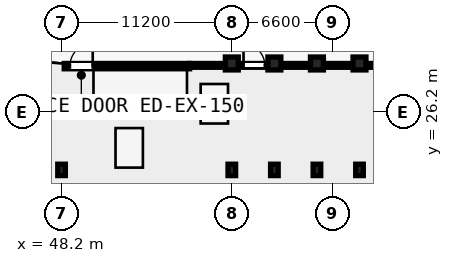
"""IFC4 building model, lengths in metres.
Left out: names, types, materials, properties, quantities, classifications, styles, units other than length and angle.
Written with IfcOpenShell. Run it as: python <this file> out.ifc"""

import sys

from ifc_helpers import new_model, si_unit, direction, frame, frame_2d, origin, origin_2d, place, context, subcontext, project, spatial, rectangle, extrude, element, fill, save


model = new_model("IFC4")
c1 = context("Model", 3, precision=1e-05, world=origin(), true_north=direction((0.0, 1.0)))
c2 = subcontext(c1, "Body", "Model", "MODEL_VIEW")
j1 = project(units=[si_unit("LENGTHUNIT", "METRE"), si_unit("PLANEANGLEUNIT", "RADIAN")], contexts=[c1])
p1 = place(None, origin())
s1 = spatial("IfcSite", under=j1, at=p1, CompositionType="ELEMENT")
p2 = place(p1, origin())
s2 = spatial("IfcBuilding", under=s1, at=p2, CompositionType="ELEMENT")
p3 = place(p2, origin())
s3 = spatial("IfcBuildingStorey", under=s2, at=p3, CompositionType="ELEMENT", Elevation=0.0)
p4 = place(p3, frame((48.375, 29.225, 0.0), z_axis=(0.0, 0.0, 1.0), x_axis=(1.0, 0.0, 0.0)))
e1 = element("IfcWall", 1, at=p4, inside=s3, PredefinedType="SHEAR", context=c2, shape_type="SweptSolid", body=[
    extrude(rectangle(XDim=8.25, YDim=0.35, at=frame_2d((4.125, 0.0))), origin(), (0.0, 0.0, 1.0), 4.15),
])
p5 = place(p4, frame((0.375, 0.0, 0.0)))
e2 = element("IfcOpeningElement", 2, at=p5, cuts=e1, PredefinedType="OPENING", context=c2, shape_type="SweptSolid", body=[
    extrude(rectangle(XDim=1.5, YDim=2.15, at=frame_2d((0.75, 1.075))), frame((0.0, 0.185, 0.0), z_axis=(0.0, -1.0, 0.0), x_axis=(1.0, 0.0, 0.0)), (0.0, 0.0, 1.0), 0.37),
])
p6 = place(p3, frame((48.55, 25.775, 0.0), z_axis=(0.0, 0.0, 1.0), x_axis=(1.0, 0.0, 0.0)))
e3 = element("IfcWall", 3, at=p6, inside=s3, PredefinedType="SHEAR", context=c2, shape_type="SweptSolid", body=[
    extrude(rectangle(XDim=7.9, YDim=0.35, at=frame_2d((3.95, 0.0))), origin(), (0.0, 0.0, 1.0), 4.15),
])
p7 = place(p6, frame((0.28, 0.0, 0.0)))
e4 = element("IfcOpeningElement", 4, at=p7, cuts=e3, PredefinedType="OPENING", context=c2, shape_type="SweptSolid", body=[
    extrude(rectangle(XDim=1.24, YDim=2.15, at=frame_2d((0.62, 1.075))), frame((0.0, 0.185, 0.0), z_axis=(0.0, -1.0, 0.0), x_axis=(1.0, 0.0, 0.0)), (0.0, 0.0, 1.0), 0.37),
])
for number, where, z_axis, x_axis in (
    (5, (48.375, 29.05, 0.0), (0.0, 0.0, 1.0), (0.0, -1.0, 0.0)),
    (6, (56.625, 29.05, 0.0), (0.0, 0.0, 1.0), (0.0, -1.0, 0.0)),
):
    element("IfcWall", number, at=place(p3, frame(where, z_axis=z_axis, x_axis=x_axis)), inside=s3, PredefinedType="SHEAR", context=c2, shape_type="SweptSolid", body=[
        extrude(rectangle(XDim=3.6, YDim=0.35, at=frame_2d((1.8, 0.0))), origin(), (0.0, 0.0, 1.0), 4.15),
    ])
p8 = place(p3, frame((48.2, 22.4, 0.0), z_axis=(0.0, 0.0, 1.0), x_axis=(1.0, 0.0, 0.0)))
e7 = element("IfcColumn", 7, at=p8, inside=s3, PredefinedType="COLUMN", context=c2, shape_type="SweptSolid", body=[
    extrude(rectangle(XDim=0.5, YDim=0.75, at=origin_2d()), origin(), (0.0, 0.0, 1.0), 4.15),
])
p9 = place(p3, frame((59.4, 29.4, 0.0), z_axis=(0.0, 0.0, 1.0), x_axis=(1.0, 0.0, 0.0)))
e8 = element("IfcColumn", 8, at=p9, inside=s3, PredefinedType="COLUMN", context=c2, shape_type="SweptSolid", body=[
    extrude(rectangle(XDim=0.85, YDim=0.85, at=origin_2d()), origin(), (0.0, 0.0, 1.0), 4.15),
])
p10 = place(p3, frame((59.4, 22.4, 0.0), z_axis=(0.0, 0.0, 1.0), x_axis=(1.0, 0.0, 0.0)))
e9 = element("IfcColumn", 9, at=p10, inside=s3, PredefinedType="COLUMN", context=c2, shape_type="SweptSolid", body=[
    extrude(rectangle(XDim=0.5, YDim=0.75, at=origin_2d()), origin(), (0.0, 0.0, 1.0), 4.15),
])
p11 = place(p3, frame((62.2, 29.4, 0.0), z_axis=(0.0, 0.0, 1.0), x_axis=(1.0, 0.0, 0.0)))
e10 = element("IfcColumn", 10, at=p11, inside=s3, PredefinedType="COLUMN", context=c2, shape_type="SweptSolid", body=[
    extrude(rectangle(XDim=0.85, YDim=0.85, at=origin_2d()), origin(), (0.0, 0.0, 1.0), 4.15),
])
p12 = place(p3, frame((62.2, 22.4, 0.0), z_axis=(0.0, 0.0, 1.0), x_axis=(1.0, 0.0, 0.0)))
e11 = element("IfcColumn", 11, at=p12, inside=s3, PredefinedType="COLUMN", context=c2, shape_type="SweptSolid", body=[
    extrude(rectangle(XDim=0.5, YDim=0.75, at=origin_2d()), origin(), (0.0, 0.0, 1.0), 4.15),
])
p13 = place(p3, frame((65.0, 29.4, 0.0), z_axis=(0.0, 0.0, 1.0), x_axis=(1.0, 0.0, 0.0)))
e12 = element("IfcColumn", 12, at=p13, inside=s3, PredefinedType="COLUMN", context=c2, shape_type="SweptSolid", body=[
    extrude(rectangle(XDim=0.85, YDim=0.85, at=origin_2d()), origin(), (0.0, 0.0, 1.0), 4.15),
])
p14 = place(p3, frame((65.0, 22.4, 0.0), z_axis=(0.0, 0.0, 1.0), x_axis=(1.0, 0.0, 0.0)))
e13 = element("IfcColumn", 13, at=p14, inside=s3, PredefinedType="COLUMN", context=c2, shape_type="SweptSolid", body=[
    extrude(rectangle(XDim=0.5, YDim=0.75, at=origin_2d()), origin(), (0.0, 0.0, 1.0), 4.15),
])
p15 = place(p3, frame((67.8, 29.4, 0.0), z_axis=(0.0, 0.0, 1.0), x_axis=(1.0, 0.0, 0.0)))
e14 = element("IfcColumn", 14, at=p15, inside=s3, PredefinedType="COLUMN", context=c2, shape_type="SweptSolid", body=[
    extrude(rectangle(XDim=0.85, YDim=0.85, at=origin_2d()), origin(), (0.0, 0.0, 1.0), 4.15),
])
p16 = place(p3, frame((67.8, 22.4, 0.0), z_axis=(0.0, 0.0, 1.0), x_axis=(1.0, 0.0, 0.0)))
e15 = element("IfcColumn", 15, at=p16, inside=s3, PredefinedType="COLUMN", context=c2, shape_type="SweptSolid", body=[
    extrude(rectangle(XDim=0.5, YDim=0.75, at=origin_2d()), origin(), (0.0, 0.0, 1.0), 4.15),
])
p17 = place(p3, frame((57.25, 28.05, 0.0), z_axis=(0.0, 0.0, 1.0), x_axis=(0.0, -1.0, 0.0)))
e16 = element("IfcWall", 16, at=p17, inside=s3, PredefinedType="STANDARD", context=c2, shape_type="SweptSolid", body=[
    extrude(rectangle(XDim=2.6, YDim=0.2, at=frame_2d((1.3, 0.0))), origin(), (0.0, 0.0, 1.0), 4.15),
])
p18 = place(p3, frame((59.25, 28.05, 0.0), z_axis=(0.0, 0.0, 1.0), x_axis=(0.0, -1.0, 0.0)))
e17 = element("IfcWall", 17, at=p18, inside=s3, PredefinedType="STANDARD", context=c2, shape_type="SweptSolid", body=[
    extrude(rectangle(XDim=2.6, YDim=0.2, at=frame_2d((1.3, 0.0))), origin(), (0.0, 0.0, 1.0), 3.492),
])
p19 = place(p3, frame((57.35, 28.15, 0.0), z_axis=(0.0, 0.0, 1.0), x_axis=(1.0, 0.0, 0.0)))
e18 = element("IfcWall", 18, at=p19, inside=s3, PredefinedType="STANDARD", context=c2, shape_type="SweptSolid", body=[
    extrude(rectangle(XDim=1.8, YDim=0.2, at=frame_2d((0.9, 0.0))), origin(), (0.0, 0.0, 1.0), 4.15),
])
p20 = place(p3, frame((57.35, 25.35, 0.0), z_axis=(0.0, 0.0, 1.0), x_axis=(1.0, 0.0, 0.0)))
e19 = element("IfcWall", 19, at=p20, inside=s3, PredefinedType="STANDARD", context=c2, shape_type="SweptSolid", body=[
    extrude(rectangle(XDim=1.8, YDim=0.2, at=frame_2d((0.9, 0.0))), origin(), (0.0, 0.0, 1.0), 4.15),
])
p21 = place(p20, frame((0.39, 0.0, 0.0)))
e20 = element("IfcOpeningElement", 20, at=p21, cuts=e19, PredefinedType="OPENING", context=c2, shape_type="SweptSolid", body=[
    extrude(rectangle(XDim=1.02, YDim=2.15, at=frame_2d((0.51, 1.075))), frame((0.0, 0.11, 0.0), z_axis=(0.0, -1.0, 0.0), x_axis=(1.0, 0.0, 0.0)), (0.0, 0.0, 1.0), 0.22),
])
p22 = place(p3, frame((51.65, 25.25, 0.0), z_axis=(0.0, 0.0, 1.0), x_axis=(1.0, 0.0, 0.0)))
e21 = element("IfcWall", 21, at=p22, inside=s3, PredefinedType="STANDARD", context=c2, shape_type="SweptSolid", body=[
    extrude(rectangle(XDim=2.0, YDim=0.2, at=frame_2d((1.0, 0.0))), origin(), (0.0, 0.0, 1.0), 4.15),
])
p23 = place(p3, frame((51.65, 22.45, 0.0), z_axis=(0.0, 0.0, 1.0), x_axis=(1.0, 0.0, 0.0)))
e22 = element("IfcWall", 22, at=p23, inside=s3, PredefinedType="STANDARD", context=c2, shape_type="SweptSolid", body=[
    extrude(rectangle(XDim=2.0, YDim=0.2, at=frame_2d((1.0, 0.0))), origin(), (0.0, 0.0, 1.0), 3.492),
])
p24 = place(p3, frame((51.65, 25.15, 0.0), z_axis=(0.0, 0.0, 1.0), x_axis=(0.0, -1.0, 0.0)))
e23 = element("IfcWall", 23, at=p24, inside=s3, PredefinedType="STANDARD", context=c2, shape_type="SweptSolid", body=[
    extrude(rectangle(XDim=2.6, YDim=0.2, at=frame_2d((1.3, 0.0))), origin(), (0.0, 0.0, 1.0), 3.492),
])
p25 = place(p3, frame((53.65, 25.15, 0.0), z_axis=(0.0, 0.0, 1.0), x_axis=(0.0, -1.0, 0.0)))
e24 = element("IfcWall", 24, at=p25, inside=s3, PredefinedType="STANDARD", context=c2, shape_type="SweptSolid", body=[
    extrude(rectangle(XDim=2.6, YDim=0.2, at=frame_2d((1.3, 0.0))), origin(), (0.0, 0.0, 1.0), 3.492),
])
p26 = place(p25, frame((0.79, 0.0, 0.0)))
e25 = element("IfcOpeningElement", 25, at=p26, cuts=e24, PredefinedType="OPENING", context=c2, shape_type="SweptSolid", body=[
    extrude(rectangle(XDim=1.02, YDim=2.15, at=frame_2d((0.51, 1.075))), frame((0.0, 0.11, 0.0), z_axis=(0.0, -1.0, 0.0), x_axis=(1.0, 0.0, 0.0)), (0.0, 0.0, 1.0), 0.22),
])
p27 = place(p3, frame((53.75, 22.4, 0.0), z_axis=(0.0, 0.0, 1.0), x_axis=(1.0, 0.0, 0.0)))
e26 = element("IfcWall", 26, at=p27, inside=s3, PredefinedType="STANDARD", context=c2, shape_type="SweptSolid", body=[
    extrude(rectangle(XDim=5.6, YDim=0.2, at=frame_2d((2.8, 0.0))), origin(), (0.0, 0.0, 1.0), 3.492),
])
p28 = place(p27, frame((1.91, 0.0, 0.0)))
e27 = element("IfcOpeningElement", 27, at=p28, cuts=e26, PredefinedType="OPENING", context=c2, shape_type="SweptSolid", body=[
    extrude(rectangle(XDim=1.22, YDim=2.15, at=frame_2d((0.61, 1.075))), frame((0.0, 0.11, 0.0), z_axis=(0.0, -1.0, 0.0), x_axis=(1.0, 0.0, 0.0)), (0.0, 0.0, 1.0), 0.22),
])
p29 = place(p3, frame((59.4, 22.4, 0.0), z_axis=(0.0, 0.0, 1.0), x_axis=(1.0, 0.0, 0.0)))
e28 = element("IfcWall", 28, at=p29, inside=s3, PredefinedType="STANDARD", context=c2, shape_type="SweptSolid", body=[
    extrude(rectangle(XDim=2.8, YDim=0.2, at=frame_2d((1.4, 0.0))), origin(), (0.0, 0.0, 1.0), 3.492),
])
p30 = place(p29, frame((0.9, 0.0, 0.0)))
e29 = element("IfcOpeningElement", 29, at=p30, cuts=e28, PredefinedType="OPENING", context=c2, shape_type="SweptSolid", body=[
    extrude(rectangle(XDim=1.0, YDim=2.15, at=frame_2d((0.5, 1.075))), frame((0.0, 0.11, 0.0), z_axis=(0.0, -1.0, 0.0), x_axis=(1.0, 0.0, 0.0)), (0.0, 0.0, 1.0), 0.22),
])
p31 = place(p3, frame((62.2, 22.4, 0.0), z_axis=(0.0, 0.0, 1.0), x_axis=(1.0, 0.0, 0.0)))
e30 = element("IfcWall", 30, at=p31, inside=s3, PredefinedType="STANDARD", context=c2, shape_type="SweptSolid", body=[
    extrude(rectangle(XDim=2.8, YDim=0.2, at=frame_2d((1.4, 0.0))), origin(), (0.0, 0.0, 1.0), 3.492),
])
p32 = place(p3, frame((65.0, 22.4, 0.0), z_axis=(0.0, 0.0, 1.0), x_axis=(1.0, 0.0, 0.0)))
e31 = element("IfcWall", 31, at=p32, inside=s3, PredefinedType="STANDARD", context=c2, shape_type="SweptSolid", body=[
    extrude(rectangle(XDim=2.8, YDim=0.2, at=frame_2d((1.4, 0.0))), origin(), (0.0, 0.0, 1.0), 3.492),
])
p33 = place(p32, frame((0.9, 0.0, 0.0)))
e32 = element("IfcOpeningElement", 32, at=p33, cuts=e31, PredefinedType="OPENING", context=c2, shape_type="SweptSolid", body=[
    extrude(rectangle(XDim=1.0, YDim=2.15, at=frame_2d((0.5, 1.075))), frame((0.0, 0.11, 0.0), z_axis=(0.0, -1.0, 0.0), x_axis=(1.0, 0.0, 0.0)), (0.0, 0.0, 1.0), 0.22),
])
p34 = place(p3, frame((67.8, 22.4, 0.0), z_axis=(0.0, 0.0, 1.0), x_axis=(1.0, 0.0, 0.0)))
e33 = element("IfcWall", 33, at=p34, inside=s3, PredefinedType="STANDARD", context=c2, shape_type="SweptSolid", body=[
    extrude(rectangle(XDim=2.8, YDim=0.2, at=frame_2d((1.4, 0.0))), origin(), (0.0, 0.0, 1.0), 3.492),
])
p35 = place(p3, frame((62.2, 29.2, 0.0), z_axis=(0.0, 0.0, 1.0), x_axis=(0.0, -1.0, 0.0)))
e34 = element("IfcWall", 34, at=p35, inside=s3, PredefinedType="PARTITIONING", context=c2, shape_type="SweptSolid", body=[
    extrude(rectangle(XDim=6.75, YDim=0.15, at=frame_2d((3.375, 0.0))), origin(), (0.0, 0.0, 1.0), 3.492),
])
p36 = place(p35, frame((2.925, 0.0, 0.0)))
e35 = element("IfcOpeningElement", 35, at=p36, cuts=e34, PredefinedType="OPENING", context=c2, shape_type="SweptSolid", body=[
    extrude(rectangle(XDim=0.9, YDim=2.1, at=frame_2d((0.45, 1.05))), frame((0.0, 0.085, 0.0), z_axis=(0.0, -1.0, 0.0), x_axis=(1.0, 0.0, 0.0)), (0.0, 0.0, 1.0), 0.17),
])
p37 = place(p3, frame((65.0, 29.2, 0.0), z_axis=(0.0, 0.0, 1.0), x_axis=(0.0, -1.0, 0.0)))
e36 = element("IfcWall", 36, at=p37, inside=s3, PredefinedType="STANDARD", context=c2, shape_type="SweptSolid", body=[
    extrude(rectangle(XDim=6.75, YDim=0.22, at=frame_2d((3.375, 0.0))), origin(), (0.0, 0.0, 1.0), 3.492),
])
p38 = place(p3, frame((67.8, 29.2, 0.0), z_axis=(0.0, 0.0, 1.0), x_axis=(0.0, -1.0, 0.0)))
e37 = element("IfcWall", 37, at=p38, inside=s3, PredefinedType="PARTITIONING", context=c2, shape_type="SweptSolid", body=[
    extrude(rectangle(XDim=6.75, YDim=0.15, at=frame_2d((3.375, 0.0))), origin(), (0.0, 0.0, 1.0), 3.492),
])
p39 = place(p38, frame((2.925, 0.0, 0.0)))
e38 = element("IfcOpeningElement", 38, at=p39, cuts=e37, PredefinedType="OPENING", context=c2, shape_type="SweptSolid", body=[
    extrude(rectangle(XDim=0.9, YDim=2.1, at=frame_2d((0.45, 1.05))), frame((0.0, 0.085, 0.0), z_axis=(0.0, -1.0, 0.0), x_axis=(1.0, 0.0, 0.0)), (0.0, 0.0, 1.0), 0.17),
])
p40 = place(p3, frame((48.2, 22.4, 0.0), z_axis=(0.0, 0.0, 1.0), x_axis=(-0.996191949488, 0.087187153726, 0.0)))
e39 = element("IfcWall", 39, at=p40, inside=s3, PredefinedType="STANDARD", context=c2, shape_type="SweptSolid", body=[
    extrude(rectangle(XDim=4.497, YDim=0.2, at=frame_2d((2.249, 0.0))), origin(), (0.0, 0.0, 1.0), 3.492),
])
p41 = place(p40, frame((1.729, 0.0, 0.0)))
e40 = element("IfcOpeningElement", 40, at=p41, cuts=e39, PredefinedType="OPENING", context=c2, shape_type="SweptSolid", body=[
    extrude(rectangle(XDim=1.04, YDim=2.15, at=frame_2d((0.52, 1.075))), frame((0.0, 0.11, 0.0), z_axis=(0.0, -1.0, 0.0), x_axis=(1.0, 0.0, 0.0)), (0.0, 0.0, 1.0), 0.22),
])
p42 = place(p3, frame((48.2, 25.65, 0.0), z_axis=(0.0, 0.0, 1.0), x_axis=(0.0, -1.0, 0.0)))
e41 = element("IfcWall", 41, at=p42, inside=s3, PredefinedType="STANDARD", context=c2, shape_type="SweptSolid", body=[
    extrude(rectangle(XDim=3.2, YDim=0.22, at=frame_2d((1.6, 0.0))), origin(), (0.0, 0.0, 1.0), 3.492),
])
p43 = place(p3, frame((56.628, 29.275, 0.0), z_axis=(0.0, 0.0, 1.0), x_axis=(1.0, 0.0, 0.0)))
e42 = element("IfcWall", 42, at=p43, inside=s3, PredefinedType="STANDARD", context=c2, shape_type="SweptSolid", body=[
    extrude(rectangle(XDim=2.422, YDim=0.25, at=frame_2d((1.211, 0.0))), origin(), (0.0, 0.0, 1.0), 3.692),
])
p44 = place(p43, frame((0.822, 0.0, 0.88)))
e43 = element("IfcOpeningElement", 43, at=p44, cuts=e42, PredefinedType="OPENING", context=c2, shape_type="SweptSolid", body=[
    extrude(rectangle(XDim=1.2, YDim=1.5, at=frame_2d((0.6, 0.75))), frame((0.0, 0.135, 0.0), z_axis=(0.0, -1.0, 0.0), x_axis=(1.0, 0.0, 0.0)), (0.0, 0.0, 1.0), 0.27),
])
p45 = place(p3, frame((59.82, 29.275, 0.0), z_axis=(0.0, 0.0, 1.0), x_axis=(1.0, 0.0, 0.0)))
e44 = element("IfcWall", 44, at=p45, inside=s3, PredefinedType="STANDARD", context=c2, shape_type="SweptSolid", body=[
    extrude(rectangle(XDim=1.96, YDim=0.25, at=frame_2d((0.98, 0.0))), origin(), (0.0, 0.0, 1.0), 3.692),
])
p46 = place(p45, frame((0.35, 0.0, 0.0)))
e45 = element("IfcOpeningElement", 45, at=p46, cuts=e44, PredefinedType="OPENING", context=c2, shape_type="SweptSolid", body=[
    extrude(rectangle(XDim=1.4, YDim=2.15, at=frame_2d((0.7, 1.075))), frame((0.0, 0.135, 0.0), z_axis=(0.0, -1.0, 0.0), x_axis=(1.0, 0.0, 0.0)), (0.0, 0.0, 1.0), 0.27),
])
p47 = place(p3, frame((62.62, 29.275, 0.0), z_axis=(0.0, 0.0, 1.0), x_axis=(1.0, 0.0, 0.0)))
e46 = element("IfcWall", 46, at=p47, inside=s3, PredefinedType="STANDARD", context=c2, shape_type="SweptSolid", body=[
    extrude(rectangle(XDim=1.96, YDim=0.25, at=frame_2d((0.98, 0.0))), origin(), (0.0, 0.0, 1.0), 3.692),
])
p48 = place(p47, frame((0.38, 0.0, 0.88)))
e47 = element("IfcOpeningElement", 47, at=p48, cuts=e46, PredefinedType="OPENING", context=c2, shape_type="SweptSolid", body=[
    extrude(rectangle(XDim=1.2, YDim=1.5, at=frame_2d((0.6, 0.75))), frame((0.0, 0.135, 0.0), z_axis=(0.0, -1.0, 0.0), x_axis=(1.0, 0.0, 0.0)), (0.0, 0.0, 1.0), 0.27),
])
p49 = place(p3, frame((65.42, 29.275, 0.0), z_axis=(0.0, 0.0, 1.0), x_axis=(1.0, 0.0, 0.0)))
e48 = element("IfcWall", 48, at=p49, inside=s3, PredefinedType="STANDARD", context=c2, shape_type="SweptSolid", body=[
    extrude(rectangle(XDim=1.96, YDim=0.25, at=frame_2d((0.98, 0.0))), origin(), (0.0, 0.0, 1.0), 3.692),
])
p50 = place(p49, frame((0.38, 0.0, 0.88)))
e49 = element("IfcOpeningElement", 49, at=p50, cuts=e48, PredefinedType="OPENING", context=c2, shape_type="SweptSolid", body=[
    extrude(rectangle(XDim=1.2, YDim=1.5, at=frame_2d((0.6, 0.75))), frame((0.0, 0.135, 0.0), z_axis=(0.0, -1.0, 0.0), x_axis=(1.0, 0.0, 0.0)), (0.0, 0.0, 1.0), 0.27),
])
p51 = place(p3, frame((68.22, 29.275, 0.0), z_axis=(0.0, 0.0, 1.0), x_axis=(1.0, 0.0, 0.0)))
e50 = element("IfcWall", 50, at=p51, inside=s3, PredefinedType="STANDARD", context=c2, shape_type="SweptSolid", body=[
    extrude(rectangle(XDim=1.96, YDim=0.25, at=frame_2d((0.98, 0.0))), origin(), (0.0, 0.0, 1.0), 3.692),
])
p52 = place(p51, frame((0.38, 0.0, 0.88)))
e51 = element("IfcOpeningElement", 51, at=p52, cuts=e50, PredefinedType="OPENING", context=c2, shape_type="SweptSolid", body=[
    extrude(rectangle(XDim=1.2, YDim=1.5, at=frame_2d((0.6, 0.75))), frame((0.0, 0.135, 0.0), z_axis=(0.0, -1.0, 0.0), x_axis=(1.0, 0.0, 0.0)), (0.0, 0.0, 1.0), 0.27),
])
p53 = place(p44, origin())
e52 = element("IfcWindow", 52, at=p53, inside=s3, PartitioningType="SINGLE_PANEL", PredefinedType="WINDOW", context=c2, shape_type="SweptSolid", body=[
    extrude(rectangle(XDim=1.2, YDim=1.5, at=frame_2d((0.6, 0.75))), frame((0.0, 0.03, 0.0), z_axis=(0.0, -1.0, 0.0), x_axis=(1.0, 0.0, 0.0)), (0.0, 0.0, 1.0), 0.06),
])
fill(e43, e52)
p54 = place(p48, origin())
e53 = element("IfcWindow", 53, at=p54, inside=s3, PartitioningType="SINGLE_PANEL", PredefinedType="WINDOW", context=c2, shape_type="SweptSolid", body=[
    extrude(rectangle(XDim=1.2, YDim=1.5, at=frame_2d((0.6, 0.75))), frame((0.0, 0.03, 0.0), z_axis=(0.0, -1.0, 0.0), x_axis=(1.0, 0.0, 0.0)), (0.0, 0.0, 1.0), 0.06),
])
fill(e47, e53)
p55 = place(p50, origin())
e54 = element("IfcWindow", 54, at=p55, inside=s3, PartitioningType="SINGLE_PANEL", PredefinedType="WINDOW", context=c2, shape_type="SweptSolid", body=[
    extrude(rectangle(XDim=1.2, YDim=1.5, at=frame_2d((0.6, 0.75))), frame((0.0, 0.03, 0.0), z_axis=(0.0, -1.0, 0.0), x_axis=(1.0, 0.0, 0.0)), (0.0, 0.0, 1.0), 0.06),
])
fill(e49, e54)
p56 = place(p52, origin())
e55 = element("IfcWindow", 55, at=p56, inside=s3, PartitioningType="SINGLE_PANEL", PredefinedType="WINDOW", context=c2, shape_type="SweptSolid", body=[
    extrude(rectangle(XDim=1.2, YDim=1.5, at=frame_2d((0.6, 0.75))), frame((0.0, 0.03, 0.0), z_axis=(0.0, -1.0, 0.0), x_axis=(1.0, 0.0, 0.0)), (0.0, 0.0, 1.0), 0.06),
])
fill(e51, e55)
p57 = place(p7, frame((1.24, 0.0, 0.0), z_axis=(0.0, 0.0, 1.0), x_axis=(-1.0, 0.0, 0.0)))
e56 = element("IfcDoor", 56, at=p57, inside=s3, OperationType="SINGLE_SWING_RIGHT", PredefinedType="DOOR", context=c2, shape_type="SweptSolid", body=[
    extrude(rectangle(XDim=1.24, YDim=2.15, at=frame_2d((0.62, 1.075))), frame((0.0, 0.025, 0.0), z_axis=(0.0, -1.0, 0.0), x_axis=(1.0, 0.0, 0.0)), (0.0, 0.0, 1.0), 0.05),
])
fill(e4, e56)
p58 = place(p5, origin())
e57 = element("IfcDoor", 57, at=p58, inside=s3, OperationType="SINGLE_SWING_RIGHT", PredefinedType="DOOR", context=c2, shape_type="SweptSolid", body=[
    extrude(rectangle(XDim=1.5, YDim=2.15, at=frame_2d((0.75, 1.075))), frame((0.0, 0.025, 0.0), z_axis=(0.0, -1.0, 0.0), x_axis=(1.0, 0.0, 0.0)), (0.0, 0.0, 1.0), 0.05),
])
fill(e2, e57)
p59 = place(p21, origin())
e58 = element("IfcDoor", 58, at=p59, inside=s3, OperationType="SLIDING_TO_RIGHT", PredefinedType="DOOR", context=c2, shape_type="SweptSolid", body=[
    extrude(rectangle(XDim=1.02, YDim=2.15, at=frame_2d((0.51, 1.075))), frame((0.0, 0.025, 0.0), z_axis=(0.0, -1.0, 0.0), x_axis=(1.0, 0.0, 0.0)), (0.0, 0.0, 1.0), 0.05),
])
fill(e20, e58)
p60 = place(p26, origin())
e59 = element("IfcDoor", 59, at=p60, inside=s3, OperationType="SLIDING_TO_RIGHT", PredefinedType="DOOR", context=c2, shape_type="SweptSolid", body=[
    extrude(rectangle(XDim=1.02, YDim=2.15, at=frame_2d((0.51, 1.075))), frame((0.0, 0.025, 0.0), z_axis=(0.0, -1.0, 0.0), x_axis=(1.0, 0.0, 0.0)), (0.0, 0.0, 1.0), 0.05),
])
fill(e25, e59)
p61 = place(p28, frame((1.22, 0.0, 0.0), z_axis=(0.0, 0.0, 1.0), x_axis=(-1.0, 0.0, 0.0)))
e60 = element("IfcDoor", 60, at=p61, inside=s3, OperationType="SINGLE_SWING_RIGHT", PredefinedType="DOOR", context=c2, shape_type="SweptSolid", body=[
    extrude(rectangle(XDim=1.22, YDim=2.15, at=frame_2d((0.61, 1.075))), frame((0.0, 0.025, 0.0), z_axis=(0.0, -1.0, 0.0), x_axis=(1.0, 0.0, 0.0)), (0.0, 0.0, 1.0), 0.05),
])
fill(e27, e60)
p62 = place(p30, frame((1.0, 0.0, 0.0), z_axis=(0.0, 0.0, 1.0), x_axis=(-1.0, 0.0, 0.0)))
e61 = element("IfcDoor", 61, at=p62, inside=s3, OperationType="SINGLE_SWING_RIGHT", PredefinedType="DOOR", context=c2, shape_type="SweptSolid", body=[
    extrude(rectangle(XDim=1.0, YDim=2.15, at=frame_2d((0.5, 1.075))), frame((0.0, 0.025, 0.0), z_axis=(0.0, -1.0, 0.0), x_axis=(1.0, 0.0, 0.0)), (0.0, 0.0, 1.0), 0.05),
])
fill(e29, e61)
p63 = place(p33, frame((1.0, 0.0, 0.0), z_axis=(0.0, 0.0, 1.0), x_axis=(-1.0, 0.0, 0.0)))
e62 = element("IfcDoor", 62, at=p63, inside=s3, OperationType="SINGLE_SWING_RIGHT", PredefinedType="DOOR", context=c2, shape_type="SweptSolid", body=[
    extrude(rectangle(XDim=1.0, YDim=2.15, at=frame_2d((0.5, 1.075))), frame((0.0, 0.025, 0.0), z_axis=(0.0, -1.0, 0.0), x_axis=(1.0, 0.0, 0.0)), (0.0, 0.0, 1.0), 0.05),
])
fill(e32, e62)
p64 = place(p36, origin())
e63 = element("IfcDoor", 63, at=p64, inside=s3, OperationType="SINGLE_SWING_LEFT", PredefinedType="DOOR", context=c2, shape_type="SweptSolid", body=[
    extrude(rectangle(XDim=0.9, YDim=2.1, at=frame_2d((0.45, 1.05))), frame((0.0, 0.025, 0.0), z_axis=(0.0, -1.0, 0.0), x_axis=(1.0, 0.0, 0.0)), (0.0, 0.0, 1.0), 0.05),
])
fill(e35, e63)
p65 = place(p39, frame((0.9, 0.0, 0.0), z_axis=(0.0, 0.0, 1.0), x_axis=(-1.0, 0.0, 0.0)))
e64 = element("IfcDoor", 64, at=p65, inside=s3, OperationType="SINGLE_SWING_RIGHT", PredefinedType="DOOR", context=c2, shape_type="SweptSolid", body=[
    extrude(rectangle(XDim=0.9, YDim=2.1, at=frame_2d((0.45, 1.05))), frame((0.0, 0.025, 0.0), z_axis=(0.0, -1.0, 0.0), x_axis=(1.0, 0.0, 0.0)), (0.0, 0.0, 1.0), 0.05),
])
fill(e38, e64)
p66 = place(p46, origin())
e65 = element("IfcDoor", 65, at=p66, inside=s3, OperationType="SINGLE_SWING_LEFT", PredefinedType="DOOR", context=c2, shape_type="SweptSolid", body=[
    extrude(rectangle(XDim=1.4, YDim=2.15, at=frame_2d((0.7, 1.075))), frame((0.0, 0.025, 0.0), z_axis=(0.0, -1.0, 0.0), x_axis=(1.0, 0.0, 0.0)), (0.0, 0.0, 1.0), 0.05),
])
fill(e45, e65)
save(model, sys.argv[1])
